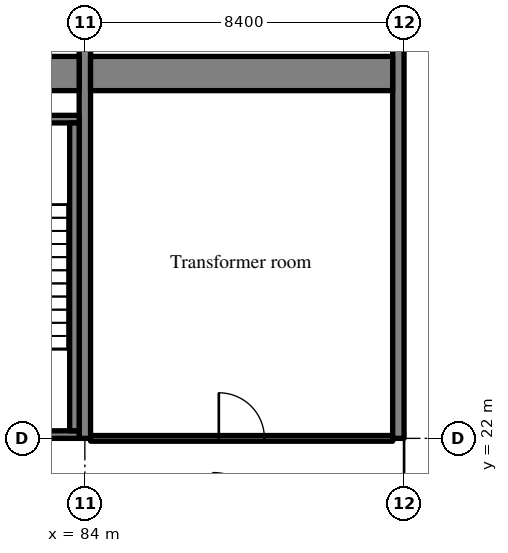
"""IFC4 building model, lengths in metres.
Left out: names, types, materials, properties, quantities, classifications, styles, units other than length and angle.
Written with IfcOpenShell. Run it as: python <this file> out.ifc"""

import sys

from ifc_helpers import new_model, si_unit, direction, frame, frame_2d, origin, place, context, subcontext, project, spatial, rectangle, extrude, source, transform, mapped, element, fill, save


model = new_model("IFC4")
c1 = context("Model", 3, precision=1e-05, world=origin(), true_north=direction((0.0, 1.0)))
c2 = subcontext(c1, "Body", "Model", "MODEL_VIEW")
j1 = project(units=[si_unit("LENGTHUNIT", "METRE"), si_unit("PLANEANGLEUNIT", "RADIAN")], contexts=[c1])
p1 = place(None, origin())
s1 = spatial("IfcSite", under=j1, at=p1, CompositionType="ELEMENT")
p2 = place(p1, origin())
s2 = spatial("IfcBuilding", under=s1, at=p2, CompositionType="ELEMENT")
p3 = place(p2, frame((0.0, 0.0, 201.0)))
s3 = spatial("IfcBuildingStorey", under=s2, at=p3, CompositionType="ELEMENT", Elevation=201.0)
m1 = source(origin(), c2, "Body", "SweptSolid", [
    extrude(rectangle(XDim=20.0, YDim=0.3, at=frame_2d((10.0, 0.0))), origin(), (0.0, 0.0, 1.0), 5.12),
])
p4 = place(p3, frame((84.0, 22.0, 0.0), z_axis=(0.0, 0.0, 1.0), x_axis=(0.0, 1.0, 0.0)))
e1 = element("IfcWall", 1, at=p4, inside=s3, PredefinedType="SHEAR", context=c2, shape_type="MappedRepresentation", body=[
    mapped(m1, transform((0.0, 0.0, 0.0), scale=1.0)),
])
m2 = source(origin(), c2, "Body", "SweptSolid", [
    extrude(rectangle(XDim=1.2, YDim=2.1, at=frame_2d((0.6, 1.05))), frame((0.0, 0.16, 0.0), z_axis=(0.0, -1.0, 0.0), x_axis=(1.0, 0.0, 0.0)), (0.0, 0.0, 1.0), 0.32),
])
p5 = place(p4, frame((13.4, 0.0, 0.0)))
e2 = element("IfcOpeningElement", 2, at=p5, cuts=e1, PredefinedType="OPENING", context=c2, shape_type="MappedRepresentation", body=[
    mapped(m2, transform((0.0, 0.0, 0.0), scale=1.0)),
])
m3 = source(origin(), c2, "Body", "SweptSolid", [
    extrude(rectangle(XDim=16.0, YDim=0.3, at=frame_2d((8.0, 0.0))), origin(), (0.0, 0.0, 1.0), 5.12),
])
p6 = place(p3, frame((92.25, 22.0, 0.0), z_axis=(0.0, 0.0, 1.0), x_axis=(0.0, 1.0, 0.0)))
e3 = element("IfcWall", 3, at=p6, inside=s3, PredefinedType="SHEAR", context=c2, shape_type="MappedRepresentation", body=[
    mapped(m3, transform((0.0, 0.0, 0.0), scale=1.0)),
])
m4 = source(origin(), c2, "Body", "SweptSolid", [
    extrude(rectangle(XDim=8.25, YDim=0.9, at=frame_2d((4.125, 0.0))), origin(), (0.0, 0.0, 1.0), 5.12),
])
p7 = place(p3, frame((75.6, 31.6, 0.0), z_axis=(0.0, 0.0, 1.0), x_axis=(1.0, 0.0, 0.0)))
e4 = element("IfcWall", 4, at=p7, inside=s3, PredefinedType="SHEAR", context=c2, shape_type="MappedRepresentation", body=[
    mapped(m4, transform((0.0, 0.0, 0.0), scale=1.0)),
])
m5 = source(origin(), c2, "Body", "SweptSolid", [
    extrude(rectangle(XDim=7.95, YDim=0.9, at=frame_2d((3.975, 0.0))), origin(), (0.0, 0.0, 1.0), 5.12),
])
p8 = place(p3, frame((84.15, 31.6, 0.0), z_axis=(0.0, 0.0, 1.0), x_axis=(1.0, 0.0, 0.0)))
e5 = element("IfcWall", 5, at=p8, inside=s3, PredefinedType="SHEAR", context=c2, shape_type="MappedRepresentation", body=[
    mapped(m5, transform((0.0, 0.0, 0.0), scale=1.0)),
])
m6 = source(origin(), c2, "Body", "SweptSolid", [
    extrude(rectangle(XDim=8.25, YDim=0.2, at=frame_2d((4.125, 0.0))), origin(), (0.0, 0.0, 1.0), 5.12),
])
p9 = place(p3, frame((83.85, 22.1, 0.0), z_axis=(0.0, 0.0, 1.0), x_axis=(-1.0, 0.0, 0.0)))
e6 = element("IfcWall", 6, at=p9, inside=s3, PredefinedType="SOLIDWALL", context=c2, shape_type="MappedRepresentation", body=[
    mapped(m6, transform((0.0, 0.0, 0.0), scale=1.0)),
])
m7 = source(origin(), c2, "Body", "SweptSolid", [
    extrude(rectangle(XDim=1.2, YDim=2.1, at=frame_2d((0.6, 1.05))), frame((0.0, 0.11, 0.0), z_axis=(0.0, -1.0, 0.0), x_axis=(1.0, 0.0, 0.0)), (0.0, 0.0, 1.0), 0.22),
])
p10 = place(p9, frame((6.05, 0.0, 0.0)))
e7 = element("IfcOpeningElement", 7, at=p10, cuts=e6, PredefinedType="OPENING", context=c2, shape_type="MappedRepresentation", body=[
    mapped(m7, transform((0.0, 0.0, 0.0), scale=1.0)),
])
p11 = place(p3, frame((83.85, 30.4, 0.0), z_axis=(0.0, 0.0, 1.0), x_axis=(-1.0, 0.0, 0.0)))
e8 = element("IfcWall", 8, at=p11, inside=s3, PredefinedType="SOLIDWALL", context=c2, shape_type="MappedRepresentation", body=[
    mapped(m6, transform((0.0, 0.0, 0.0), scale=1.0)),
])
m8 = source(origin(), c2, "Body", "SweptSolid", [
    extrude(rectangle(XDim=1.0, YDim=2.1, at=frame_2d((0.5, 1.05))), frame((0.0, 0.11, 0.0), z_axis=(0.0, -1.0, 0.0), x_axis=(1.0, 0.0, 0.0)), (0.0, 0.0, 1.0), 0.22),
])
p12 = place(p11, frame((6.15, 0.0, 0.0)))
e9 = element("IfcOpeningElement", 9, at=p12, cuts=e8, PredefinedType="OPENING", context=c2, shape_type="MappedRepresentation", body=[
    mapped(m8, transform((0.0, 0.0, 0.0), scale=1.0)),
])
m9 = source(origin(), c2, "Body", "SweptSolid", [
    extrude(rectangle(XDim=8.1, YDim=0.25, at=frame_2d((4.05, 0.0))), origin(), (0.0, 0.0, 1.0), 5.12),
])
p13 = place(p3, frame((83.725, 22.2, 0.0), z_axis=(0.0, 0.0, 1.0), x_axis=(0.0, 1.0, 0.0)))
e10 = element("IfcWall", 10, at=p13, inside=s3, PredefinedType="SOLIDWALL", context=c2, shape_type="MappedRepresentation", body=[
    mapped(m9, transform((0.0, 0.0, 0.0), scale=1.0)),
])
m10 = source(origin(), c2, "Body", "SweptSolid", [
    extrude(rectangle(XDim=7.95, YDim=0.15, at=frame_2d((3.975, 0.0))), origin(), (0.0, 0.0, 1.0), 4.37),
])
p14 = place(p3, frame((84.15, 22.0, 0.0), z_axis=(0.0, 0.0, 1.0), x_axis=(1.0, 0.0, 0.0)))
e11 = element("IfcWall", 11, at=p14, inside=s3, PredefinedType="PARTITIONING", context=c2, shape_type="MappedRepresentation", body=[
    mapped(m10, transform((0.0, 0.0, 0.0), scale=1.0)),
])
m11 = source(origin(), c2, "Body", "SweptSolid", [
    extrude(rectangle(XDim=1.2, YDim=2.1, at=frame_2d((0.6, 1.05))), frame((0.0, 0.085, 0.0), z_axis=(0.0, -1.0, 0.0), x_axis=(1.0, 0.0, 0.0)), (0.0, 0.0, 1.0), 0.17),
])
p15 = place(p14, frame((3.375, 0.0, 0.0)))
e12 = element("IfcOpeningElement", 12, at=p15, cuts=e11, PredefinedType="OPENING", context=c2, shape_type="MappedRepresentation", body=[
    mapped(m11, transform((0.0, 0.0, 0.0), scale=1.0)),
])
m12 = source(origin(), c2, "Body", "SweptSolid", [
    extrude(rectangle(XDim=1.2, YDim=2.1, at=frame_2d((0.6, 1.05))), frame((0.0, 0.025, 0.0), z_axis=(0.0, -1.0, 0.0), x_axis=(1.0, 0.0, 0.0)), (0.0, 0.0, 1.0), 0.05),
])
p16 = place(p15, origin())
e13 = element("IfcDoor", 13, at=p16, inside=s3, OperationType="SINGLE_SWING_LEFT", PredefinedType="DOOR", context=c2, shape_type="MappedRepresentation", body=[
    mapped(m12, transform((0.0, 0.0, 0.0), scale=1.0)),
])
fill(e12, e13)
save(model, sys.argv[1])
